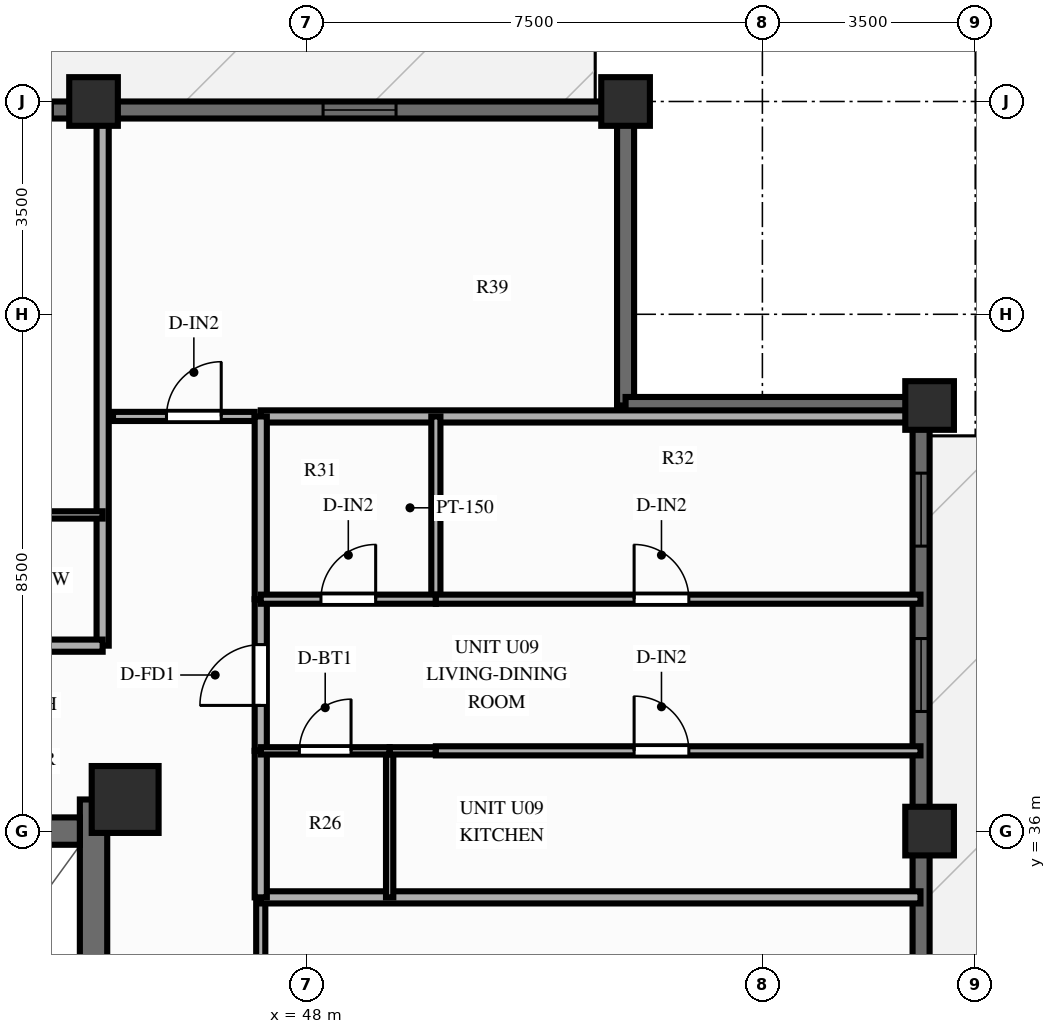
"""IFC4 building model, lengths in metres.
Left out: names, types, materials, properties, quantities, classifications, styles, units other than length and angle.
Written with IfcOpenShell. Run it as: python <this file> out.ifc"""

import sys

from ifc_helpers import new_model, si_unit, direction, frame, frame_2d, origin, origin_2d, place, context, subcontext, project, spatial, rectangle, extrude, source, transform, mapped, element, fill, save


model = new_model("IFC4")
c1 = context("Model", 3, precision=1e-05, world=origin(), true_north=direction((0.0, 1.0)))
c2 = subcontext(c1, "Body", "Model", "MODEL_VIEW")
j1 = project(units=[si_unit("LENGTHUNIT", "METRE"), si_unit("PLANEANGLEUNIT", "RADIAN")], contexts=[c1])
p1 = place(None, origin())
s1 = spatial("IfcSite", under=j1, at=p1, CompositionType="ELEMENT")
p2 = place(p1, origin())
s2 = spatial("IfcBuilding", under=s1, at=p2, CompositionType="ELEMENT")
p3 = place(p2, frame((0.0, 0.0, 189.7)))
s3 = spatial("IfcBuildingStorey", under=s2, at=p3, CompositionType="ELEMENT", Elevation=189.7)
p4 = place(p3, frame((44.5, 17.48, 0.0), z_axis=(0.0, 0.0, 1.0), x_axis=(0.0, 1.0, 0.0)))
e1 = element("IfcWall", 1, at=p4, inside=s3, PredefinedType="SHEAR", context=c2, shape_type="SweptSolid", body=[
    extrude(rectangle(XDim=19.04, YDim=0.45, at=frame_2d((9.52, 0.0))), origin(), (0.0, 0.0, 1.0), 3.0),
])
p5 = place(p4, frame((12.67, 0.0, 0.0), z_axis=(0.0, 0.0, 1.0), x_axis=(-1.0, 0.0, 0.0)))
e2 = element("IfcOpeningElement", 2, at=p5, cuts=e1, PredefinedType="OPENING", context=c2, shape_type="SweptSolid", body=[
    extrude(rectangle(XDim=1.1, YDim=2.15, at=frame_2d((0.55, 1.075))), frame((0.0, 0.237, 0.0), z_axis=(0.0, -1.0, 0.0), x_axis=(1.0, 0.0, 0.0)), (0.0, 0.0, 1.0), 0.474),
])
p6 = place(p3, frame((31.725, 36.0, 0.0), z_axis=(0.0, 0.0, 1.0), x_axis=(1.0, 0.0, 0.0)))
e3 = element("IfcWall", 3, at=p6, inside=s3, PredefinedType="SHEAR", context=c2, shape_type="SweptSolid", body=[
    extrude(rectangle(XDim=12.55, YDim=0.45, at=frame_2d((6.275, 0.0))), origin(), (0.0, 0.0, 1.0), 3.0),
])
p7 = place(p6, frame((5.225, 0.0, 0.0), z_axis=(0.0, 0.0, 1.0), x_axis=(-1.0, 0.0, 0.0)))
e4 = element("IfcOpeningElement", 4, at=p7, cuts=e3, PredefinedType="OPENING", context=c2, shape_type="SweptSolid", body=[
    extrude(rectangle(XDim=1.4, YDim=2.15, at=frame_2d((0.7, 1.075))), frame((0.0, 0.237, 0.0), z_axis=(0.0, -1.0, 0.0), x_axis=(1.0, 0.0, 0.0)), (0.0, 0.0, 1.0), 0.474),
])
m1 = source(origin(), c2, "Body", "SweptSolid", [
    extrude(rectangle(XDim=1.1, YDim=1.1, at=origin_2d()), origin(), (0.0, 0.0, 1.0), 3.0),
])
p8 = place(p3, frame((45.02, 36.52, 0.0), z_axis=(0.0, 0.0, 1.0), x_axis=(1.0, 0.0, 0.0)))
e5 = element("IfcColumn", 5, at=p8, inside=s3, PredefinedType="COLUMN", context=c2, shape_type="MappedRepresentation", body=[
    mapped(m1, transform((0.0, 0.0, 0.0), scale=1.0)),
])
m2 = source(origin(), c2, "Body", "SweptSolid", [
    extrude(rectangle(XDim=0.8, YDim=0.8, at=origin_2d()), origin(), (0.0, 0.0, 1.0), 3.0),
])
for number, where, z_axis, x_axis in (
    (6, (58.25, 36.0, 0.0), (0.0, 0.0, 1.0), (1.0, 0.0, 0.0)),
    (7, (58.25, 43.0, 0.0), (0.0, 0.0, 1.0), (1.0, 0.0, 0.0)),
    (8, (53.25, 48.0, 0.0), (0.0, 0.0, 1.0), (1.0, 0.0, 0.0)),
    (9, (44.5, 48.0, 0.0), (0.0, 0.0, 1.0), (1.0, 0.0, 0.0)),
):
    element("IfcColumn", number, at=place(p3, frame(where, z_axis=z_axis, x_axis=x_axis)), inside=s3, PredefinedType="COLUMN", context=c2, shape_type="MappedRepresentation", body=[
        mapped(m2, transform((0.0, 0.0, 0.0), scale=1.0)),
    ])
p9 = place(p3, frame((22.75, 47.86, 0.0), z_axis=(0.0, 0.0, 1.0), x_axis=(1.0, 0.0, 0.0)))
e10 = element("IfcWall", 10, at=p9, inside=s3, PredefinedType="SOLIDWALL", context=c2, shape_type="SweptSolid", body=[
    extrude(rectangle(XDim=30.5, YDim=0.28, at=frame_2d((15.25, 0.0))), origin(), (0.0, 0.0, 1.0), 2.28),
])
p10 = place(p9, frame((3.825, 0.0, 0.0)))
e11 = element("IfcOpeningElement", 11, at=p10, cuts=e10, PredefinedType="OPENING", context=c2, shape_type="SweptSolid", body=[
    extrude(rectangle(XDim=1.1, YDim=2.15, at=frame_2d((0.55, 1.075))), frame((0.0, 0.152, 0.0), z_axis=(0.0, -1.0, 0.0), x_axis=(1.0, 0.0, 0.0)), (0.0, 0.0, 1.0), 0.304),
])
p11 = place(p9, frame((9.395, 0.0, 0.25)))
e12 = element("IfcOpeningElement", 12, at=p11, cuts=e10, PredefinedType="OPENING", context=c2, shape_type="SweptSolid", body=[
    extrude(rectangle(XDim=0.95, YDim=1.5, at=frame_2d((0.475, 0.75))), frame((0.0, 0.152, 0.0), z_axis=(0.0, -1.0, 0.0), x_axis=(1.0, 0.0, 0.0)), (0.0, 0.0, 1.0), 0.304),
])
p12 = place(p9, frame((11.483, 0.0, 0.25)))
e13 = element("IfcOpeningElement", 13, at=p12, cuts=e10, PredefinedType="OPENING", context=c2, shape_type="SweptSolid", body=[
    extrude(rectangle(XDim=1.2, YDim=1.5, at=frame_2d((0.6, 0.75))), frame((0.0, 0.152, 0.0), z_axis=(0.0, -1.0, 0.0), x_axis=(1.0, 0.0, 0.0)), (0.0, 0.0, 1.0), 0.304),
])
p13 = place(p9, frame((14.383, 0.0, 0.25)))
e14 = element("IfcOpeningElement", 14, at=p13, cuts=e10, PredefinedType="OPENING", context=c2, shape_type="SweptSolid", body=[
    extrude(rectangle(XDim=1.2, YDim=1.5, at=frame_2d((0.6, 0.75))), frame((0.0, 0.152, 0.0), z_axis=(0.0, -1.0, 0.0), x_axis=(1.0, 0.0, 0.0)), (0.0, 0.0, 1.0), 0.304),
])
p14 = place(p9, frame((17.393, 0.0, 0.25)))
e15 = element("IfcOpeningElement", 15, at=p14, cuts=e10, PredefinedType="OPENING", context=c2, shape_type="SweptSolid", body=[
    extrude(rectangle(XDim=1.2, YDim=1.5, at=frame_2d((0.6, 0.75))), frame((0.0, 0.152, 0.0), z_axis=(0.0, -1.0, 0.0), x_axis=(1.0, 0.0, 0.0)), (0.0, 0.0, 1.0), 0.304),
])
p15 = place(p9, frame((19.874, 0.0, 0.25)))
e16 = element("IfcOpeningElement", 16, at=p15, cuts=e10, PredefinedType="OPENING", context=c2, shape_type="SweptSolid", body=[
    extrude(rectangle(XDim=1.2, YDim=1.5, at=frame_2d((0.6, 0.75))), frame((0.0, 0.152, 0.0), z_axis=(0.0, -1.0, 0.0), x_axis=(1.0, 0.0, 0.0)), (0.0, 0.0, 1.0), 0.304),
])
p16 = place(p9, frame((25.525, 0.0, 0.25)))
e17 = element("IfcOpeningElement", 17, at=p16, cuts=e10, PredefinedType="OPENING", context=c2, shape_type="SweptSolid", body=[
    extrude(rectangle(XDim=1.2, YDim=1.5, at=frame_2d((0.6, 0.75))), frame((0.0, 0.152, 0.0), z_axis=(0.0, -1.0, 0.0), x_axis=(1.0, 0.0, 0.0)), (0.0, 0.0, 1.0), 0.304),
])
p17 = place(p3, frame((58.11, 11.0, 0.0), z_axis=(0.0, 0.0, 1.0), x_axis=(0.0, 1.0, 0.0)))
e18 = element("IfcWall", 18, at=p17, inside=s3, PredefinedType="SOLIDWALL", context=c2, shape_type="SweptSolid", body=[
    extrude(rectangle(XDim=32.0, YDim=0.28, at=frame_2d((16.0, 0.0))), origin(), (0.0, 0.0, 1.0), 2.28),
])
p18 = place(p17, frame((2.9, 0.0, 0.25)))
e19 = element("IfcOpeningElement", 19, at=p18, cuts=e18, PredefinedType="OPENING", context=c2, shape_type="SweptSolid", body=[
    extrude(rectangle(XDim=1.2, YDim=1.5, at=frame_2d((0.6, 0.75))), frame((0.0, 0.152, 0.0), z_axis=(0.0, -1.0, 0.0), x_axis=(1.0, 0.0, 0.0)), (0.0, 0.0, 1.0), 0.304),
])
p19 = place(p17, frame((8.597, 0.0, 0.25)))
e20 = element("IfcOpeningElement", 20, at=p19, cuts=e18, PredefinedType="OPENING", context=c2, shape_type="SweptSolid", body=[
    extrude(rectangle(XDim=1.2, YDim=1.5, at=frame_2d((0.6, 0.75))), frame((0.0, 0.152, 0.0), z_axis=(0.0, -1.0, 0.0), x_axis=(1.0, 0.0, 0.0)), (0.0, 0.0, 1.0), 0.304),
])
p20 = place(p17, frame((11.05, 0.0, 0.25)))
e21 = element("IfcOpeningElement", 21, at=p20, cuts=e18, PredefinedType="OPENING", context=c2, shape_type="SweptSolid", body=[
    extrude(rectangle(XDim=1.2, YDim=1.5, at=frame_2d((0.6, 0.75))), frame((0.0, 0.152, 0.0), z_axis=(0.0, -1.0, 0.0), x_axis=(1.0, 0.0, 0.0)), (0.0, 0.0, 1.0), 0.304),
])
p21 = place(p17, frame((13.897, 0.0, 0.25)))
e22 = element("IfcOpeningElement", 22, at=p21, cuts=e18, PredefinedType="OPENING", context=c2, shape_type="SweptSolid", body=[
    extrude(rectangle(XDim=1.2, YDim=1.5, at=frame_2d((0.6, 0.75))), frame((0.0, 0.152, 0.0), z_axis=(0.0, -1.0, 0.0), x_axis=(1.0, 0.0, 0.0)), (0.0, 0.0, 1.0), 0.304),
])
p22 = place(p17, frame((20.755, 0.0, 0.0), z_axis=(0.0, 0.0, 1.0), x_axis=(-1.0, 0.0, 0.0)))
e23 = element("IfcOpeningElement", 23, at=p22, cuts=e18, PredefinedType="OPENING", context=c2, shape_type="SweptSolid", body=[
    extrude(rectangle(XDim=1.6, YDim=2.15, at=frame_2d((0.8, 1.075))), frame((0.0, 0.152, 0.0), z_axis=(0.0, -1.0, 0.0), x_axis=(1.0, 0.0, 0.0)), (0.0, 0.0, 1.0), 0.304),
])
p23 = place(p17, frame((26.967, 0.0, 0.25)))
e24 = element("IfcOpeningElement", 24, at=p23, cuts=e18, PredefinedType="OPENING", context=c2, shape_type="SweptSolid", body=[
    extrude(rectangle(XDim=1.2, YDim=1.5, at=frame_2d((0.6, 0.75))), frame((0.0, 0.152, 0.0), z_axis=(0.0, -1.0, 0.0), x_axis=(1.0, 0.0, 0.0)), (0.0, 0.0, 1.0), 0.304),
])
p24 = place(p17, frame((29.687, 0.0, 0.25)))
e25 = element("IfcOpeningElement", 25, at=p24, cuts=e18, PredefinedType="OPENING", context=c2, shape_type="SweptSolid", body=[
    extrude(rectangle(XDim=1.2, YDim=1.5, at=frame_2d((0.6, 0.75))), frame((0.0, 0.152, 0.0), z_axis=(0.0, -1.0, 0.0), x_axis=(1.0, 0.0, 0.0)), (0.0, 0.0, 1.0), 0.304),
])
for number, where, z_axis, x_axis in (
    (26, (53.25, 43.0, 0.0), (0.0, 0.0, 1.0), (0.0, 1.0, 0.0)),
    (27, (53.25, 43.0, 0.0), (0.0, 0.0, 1.0), (1.0, 0.0, 0.0)),
):
    element("IfcWall", number, at=place(p3, frame(where, z_axis=z_axis, x_axis=x_axis)), inside=s3, PredefinedType="SOLIDWALL", context=c2, shape_type="SweptSolid", body=[
        extrude(rectangle(XDim=4.92, YDim=0.28, at=frame_2d((2.46, 0.0))), origin(), (0.0, 0.0, 1.0), 2.28),
    ])
p25 = place(p3, frame((44.82, 42.82, 0.0), z_axis=(0.0, 0.0, 1.0), x_axis=(1.0, 0.0, 0.0)))
e28 = element("IfcWall", 28, at=p25, inside=s3, PredefinedType="PARTITIONING", context=c2, shape_type="SweptSolid", body=[
    extrude(rectangle(XDim=2.33, YDim=0.15, at=frame_2d((1.165, 0.0))), origin(), (0.0, 0.0, 1.0), 2.79),
])
p26 = place(p25, frame((0.88, 0.0, 0.0)))
e29 = element("IfcOpeningElement", 29, at=p26, cuts=e28, PredefinedType="OPENING", context=c2, shape_type="SweptSolid", body=[
    extrude(rectangle(XDim=0.9, YDim=2.1, at=frame_2d((0.45, 1.05))), frame((0.0, 0.087, 0.0), z_axis=(0.0, -1.0, 0.0), x_axis=(1.0, 0.0, 0.0)), (0.0, 0.0, 1.0), 0.174),
])
p27 = place(p3, frame((44.65, 39.05, 0.0), z_axis=(0.0, 0.0, 1.0), x_axis=(0.0, 1.0, 0.0)))
e30 = element("IfcWall", 30, at=p27, inside=s3, PredefinedType="PARTITIONING", context=c2, shape_type="SweptSolid", body=[
    extrude(rectangle(XDim=8.8, YDim=0.2, at=frame_2d((4.4, 0.0))), origin(), (0.0, 0.0, 1.0), 2.39),
])
p28 = place(p3, frame((42.188, 39.05, 0.0), z_axis=(0.0, 0.0, 1.0), x_axis=(1.0, 0.0, 0.0)))
e31 = element("IfcWall", 31, at=p28, inside=s3, PredefinedType="PARTITIONING", context=c2, shape_type="SweptSolid", body=[
    extrude(rectangle(XDim=2.462, YDim=0.2, at=frame_2d((1.231, 0.0))), origin(), (0.0, 0.0, 1.0), 2.79),
])
p29 = place(p3, frame((42.188, 41.2, 0.0), z_axis=(0.0, 0.0, 1.0), x_axis=(1.0, 0.0, 0.0)))
e32 = element("IfcWall", 32, at=p29, inside=s3, PredefinedType="PARTITIONING", context=c2, shape_type="SweptSolid", body=[
    extrude(rectangle(XDim=2.462, YDim=0.12, at=frame_2d((1.231, 0.0))), origin(), (0.0, 0.0, 1.0), 2.79),
])
p30 = place(p3, frame((47.25, 42.82, 0.0), z_axis=(0.0, 0.0, 1.0), x_axis=(1.0, 0.0, 0.0)))
e33 = element("IfcWall", 33, at=p30, inside=s3, PredefinedType="PARTITIONING", context=c2, shape_type="SweptSolid", body=[
    extrude(rectangle(XDim=10.85, YDim=0.2, at=frame_2d((5.425, 0.0))), origin(), (0.0, 0.0, 1.0), 2.79),
])
p31 = place(p3, frame((47.25, 27.0, 0.0), z_axis=(0.0, 0.0, 1.0), x_axis=(0.0, 1.0, 0.0)))
e34 = element("IfcWall", 34, at=p31, inside=s3, PredefinedType="PARTITIONING", context=c2, shape_type="SweptSolid", body=[
    extrude(rectangle(XDim=7.91, YDim=0.15, at=frame_2d((3.955, 0.0))), origin(), (0.0, 0.0, 1.0), 2.79),
])
p32 = place(p31, frame((3.405, 0.0, 0.0)))
e35 = element("IfcOpeningElement", 35, at=p32, cuts=e34, PredefinedType="OPENING", context=c2, shape_type="SweptSolid", body=[
    extrude(rectangle(XDim=1.1, YDim=2.15, at=frame_2d((0.55, 1.075))), frame((0.0, 0.087, 0.0), z_axis=(0.0, -1.0, 0.0), x_axis=(1.0, 0.0, 0.0)), (0.0, 0.0, 1.0), 0.174),
])
p33 = place(p3, frame((47.25, 34.91, 0.0), z_axis=(0.0, 0.0, 1.0), x_axis=(1.0, 0.0, 0.0)))
e36 = element("IfcWall", 36, at=p33, inside=s3, PredefinedType="PARTITIONING", context=c2, shape_type="SweptSolid", body=[
    extrude(rectangle(XDim=10.85, YDim=0.2, at=frame_2d((5.425, 0.0))), origin(), (0.0, 0.0, 1.0), 2.79),
])
p34 = place(p3, frame((47.25, 34.91, 0.0), z_axis=(0.0, 0.0, 1.0), x_axis=(0.0, 1.0, 0.0)))
e37 = element("IfcWall", 37, at=p34, inside=s3, PredefinedType="PARTITIONING", context=c2, shape_type="SweptSolid", body=[
    extrude(rectangle(XDim=2.41, YDim=0.2, at=frame_2d((1.205, 0.0))), origin(), (0.0, 0.0, 1.0), 2.79),
])
p35 = place(p3, frame((47.25, 37.32, 0.0), z_axis=(0.0, 0.0, 1.0), x_axis=(0.0, 1.0, 0.0)))
e38 = element("IfcWall", 38, at=p35, inside=s3, PredefinedType="PARTITIONING", context=c2, shape_type="SweptSolid", body=[
    extrude(rectangle(XDim=2.494, YDim=0.2, at=frame_2d((1.247, 0.0))), origin(), (0.0, 0.0, 1.0), 2.79),
])
p36 = place(p35, frame((0.747, 0.0, 0.0)))
e39 = element("IfcOpeningElement", 39, at=p36, cuts=e38, PredefinedType="OPENING", context=c2, shape_type="SweptSolid", body=[
    extrude(rectangle(XDim=1.0, YDim=2.15, at=frame_2d((0.5, 1.075))), frame((0.0, 0.112, 0.0), z_axis=(0.0, -1.0, 0.0), x_axis=(1.0, 0.0, 0.0)), (0.0, 0.0, 1.0), 0.224),
])
p37 = place(p3, frame((47.25, 39.814, 0.0), z_axis=(0.0, 0.0, 1.0), x_axis=(0.0, 1.0, 0.0)))
e40 = element("IfcWall", 40, at=p37, inside=s3, PredefinedType="PARTITIONING", context=c2, shape_type="SweptSolid", body=[
    extrude(rectangle(XDim=3.006, YDim=0.2, at=frame_2d((1.503, 0.0))), origin(), (0.0, 0.0, 1.0), 2.79),
])
p38 = place(p3, frame((49.37, 34.91, 0.0), z_axis=(0.0, 0.0, 1.0), x_axis=(0.0, 1.0, 0.0)))
e41 = element("IfcWall", 41, at=p38, inside=s3, PredefinedType="PARTITIONING", context=c2, shape_type="SweptSolid", body=[
    extrude(rectangle(XDim=2.41, YDim=0.12, at=frame_2d((1.205, 0.0))), origin(), (0.0, 0.0, 1.0), 2.79),
])
p39 = place(p3, frame((50.13, 39.814, 0.0), z_axis=(0.0, 0.0, 1.0), x_axis=(0.0, 1.0, 0.0)))
e42 = element("IfcWall", 42, at=p39, inside=s3, PredefinedType="PARTITIONING", context=c2, shape_type="SweptSolid", body=[
    extrude(rectangle(XDim=3.006, YDim=0.15, at=frame_2d((1.503, 0.0))), origin(), (0.0, 0.0, 1.0), 2.79),
])
p40 = place(p3, frame((47.25, 37.32, 0.0), z_axis=(0.0, 0.0, 1.0), x_axis=(1.0, 0.0, 0.0)))
e43 = element("IfcWall", 43, at=p40, inside=s3, PredefinedType="PARTITIONING", context=c2, shape_type="SweptSolid", body=[
    extrude(rectangle(XDim=2.12, YDim=0.12, at=frame_2d((1.06, 0.0))), origin(), (0.0, 0.0, 1.0), 2.79),
])
p41 = place(p40, frame((0.635, 0.0, 0.0)))
e44 = element("IfcOpeningElement", 44, at=p41, cuts=e43, PredefinedType="OPENING", context=c2, shape_type="SweptSolid", body=[
    extrude(rectangle(XDim=0.85, YDim=2.05, at=frame_2d((0.425, 1.025))), frame((0.0, 0.072, 0.0), z_axis=(0.0, -1.0, 0.0), x_axis=(1.0, 0.0, 0.0)), (0.0, 0.0, 1.0), 0.144),
])
p42 = place(p3, frame((49.37, 37.32, 0.0), z_axis=(0.0, 0.0, 1.0), x_axis=(1.0, 0.0, 0.0)))
e45 = element("IfcWall", 45, at=p42, inside=s3, PredefinedType="PARTITIONING", context=c2, shape_type="SweptSolid", body=[
    extrude(rectangle(XDim=0.76, YDim=0.12, at=frame_2d((0.38, 0.0))), origin(), (0.0, 0.0, 1.0), 2.79),
])
p43 = place(p3, frame((50.13, 37.32, 0.0), z_axis=(0.0, 0.0, 1.0), x_axis=(1.0, 0.0, 0.0)))
e46 = element("IfcWall", 46, at=p43, inside=s3, PredefinedType="PARTITIONING", context=c2, shape_type="SweptSolid", body=[
    extrude(rectangle(XDim=7.97, YDim=0.15, at=frame_2d((3.985, 0.0))), origin(), (0.0, 0.0, 1.0), 2.79),
])
p44 = place(p43, frame((3.26, 0.0, 0.0)))
e47 = element("IfcOpeningElement", 47, at=p44, cuts=e46, PredefinedType="OPENING", context=c2, shape_type="SweptSolid", body=[
    extrude(rectangle(XDim=0.9, YDim=2.1, at=frame_2d((0.45, 1.05))), frame((0.0, 0.087, 0.0), z_axis=(0.0, -1.0, 0.0), x_axis=(1.0, 0.0, 0.0)), (0.0, 0.0, 1.0), 0.174),
])
p45 = place(p3, frame((47.25, 39.814, 0.0), z_axis=(0.0, 0.0, 1.0), x_axis=(1.0, 0.0, 0.0)))
e48 = element("IfcWall", 48, at=p45, inside=s3, PredefinedType="PARTITIONING", context=c2, shape_type="SweptSolid", body=[
    extrude(rectangle(XDim=2.88, YDim=0.15, at=frame_2d((1.44, 0.0))), origin(), (0.0, 0.0, 1.0), 2.79),
])
p46 = place(p45, frame((0.99, 0.0, 0.0)))
e49 = element("IfcOpeningElement", 49, at=p46, cuts=e48, PredefinedType="OPENING", context=c2, shape_type="SweptSolid", body=[
    extrude(rectangle(XDim=0.9, YDim=2.1, at=frame_2d((0.45, 1.05))), frame((0.0, 0.087, 0.0), z_axis=(0.0, -1.0, 0.0), x_axis=(1.0, 0.0, 0.0)), (0.0, 0.0, 1.0), 0.174),
])
p47 = place(p3, frame((50.13, 39.814, 0.0), z_axis=(0.0, 0.0, 1.0), x_axis=(1.0, 0.0, 0.0)))
e50 = element("IfcWall", 50, at=p47, inside=s3, PredefinedType="PARTITIONING", context=c2, shape_type="SweptSolid", body=[
    extrude(rectangle(XDim=7.97, YDim=0.15, at=frame_2d((3.985, 0.0))), origin(), (0.0, 0.0, 1.0), 2.79),
])
p48 = place(p47, frame((3.26, 0.0, 0.0)))
e51 = element("IfcOpeningElement", 51, at=p48, cuts=e50, PredefinedType="OPENING", context=c2, shape_type="SweptSolid", body=[
    extrude(rectangle(XDim=0.9, YDim=2.1, at=frame_2d((0.45, 1.05))), frame((0.0, 0.087, 0.0), z_axis=(0.0, -1.0, 0.0), x_axis=(1.0, 0.0, 0.0)), (0.0, 0.0, 1.0), 0.174),
])
m3 = source(origin(), c2, "Body", "SweptSolid", [
    extrude(rectangle(XDim=1.2, YDim=1.5, at=frame_2d((0.6, 0.75))), frame((0.0, 0.03, 0.0), z_axis=(0.0, -1.0, 0.0), x_axis=(1.0, 0.0, 0.0)), (0.0, 0.0, 1.0), 0.06),
])
p49 = place(p15, origin())
e52 = element("IfcWindow", 52, at=p49, inside=s3, PartitioningType="SINGLE_PANEL", PredefinedType="WINDOW", context=c2, shape_type="MappedRepresentation", body=[
    mapped(m3, transform((0.0, 0.0, 0.0), scale=1.0)),
])
fill(e16, e52)
p50 = place(p16, origin())
e53 = element("IfcWindow", 53, at=p50, inside=s3, PartitioningType="SINGLE_PANEL", PredefinedType="WINDOW", context=c2, shape_type="MappedRepresentation", body=[
    mapped(m3, transform((0.0, 0.0, 0.0), scale=1.0)),
])
fill(e17, e53)
p51 = place(p23, origin())
e54 = element("IfcWindow", 54, at=p51, inside=s3, PartitioningType="SINGLE_PANEL", PredefinedType="WINDOW", context=c2, shape_type="MappedRepresentation", body=[
    mapped(m3, transform((0.0, 0.0, 0.0), scale=1.0)),
])
fill(e24, e54)
p52 = place(p24, origin())
e55 = element("IfcWindow", 55, at=p52, inside=s3, PartitioningType="SINGLE_PANEL", PredefinedType="WINDOW", context=c2, shape_type="MappedRepresentation", body=[
    mapped(m3, transform((0.0, 0.0, 0.0), scale=1.0)),
])
fill(e25, e55)
m4 = source(origin(), c2, "Body", "SweptSolid", [
    extrude(rectangle(XDim=0.9, YDim=2.1, at=frame_2d((0.45, 1.05))), frame((0.0, 0.025, 0.0), z_axis=(0.0, -1.0, 0.0), x_axis=(1.0, 0.0, 0.0)), (0.0, 0.0, 1.0), 0.05),
])
p53 = place(p26, origin())
e56 = element("IfcDoor", 56, at=p53, inside=s3, OperationType="SINGLE_SWING_RIGHT", PredefinedType="DOOR", context=c2, shape_type="MappedRepresentation", body=[
    mapped(m4, transform((0.0, 0.0, 0.0), scale=1.0)),
])
fill(e29, e56)
m5 = source(origin(), c2, "Body", "SweptSolid", [
    extrude(rectangle(XDim=1.0, YDim=2.15, at=frame_2d((0.5, 1.075))), frame((0.0, 0.025, 0.0), z_axis=(0.0, -1.0, 0.0), x_axis=(1.0, 0.0, 0.0)), (0.0, 0.0, 1.0), 0.05),
])
p54 = place(p36, origin())
e57 = element("IfcDoor", 57, at=p54, inside=s3, OperationType="SINGLE_SWING_LEFT", PredefinedType="DOOR", context=c2, shape_type="MappedRepresentation", body=[
    mapped(m5, transform((0.0, 0.0, 0.0), scale=1.0)),
])
fill(e39, e57)
m6 = source(origin(), c2, "Body", "SweptSolid", [
    extrude(rectangle(XDim=0.85, YDim=2.05, at=frame_2d((0.425, 1.025))), frame((0.0, 0.025, 0.0), z_axis=(0.0, -1.0, 0.0), x_axis=(1.0, 0.0, 0.0)), (0.0, 0.0, 1.0), 0.05),
])
p55 = place(p41, origin())
e58 = element("IfcDoor", 58, at=p55, inside=s3, OperationType="SINGLE_SWING_RIGHT", PredefinedType="DOOR", context=c2, shape_type="MappedRepresentation", body=[
    mapped(m6, transform((0.0, 0.0, 0.0), scale=1.0)),
])
fill(e44, e58)
p56 = place(p44, origin())
e59 = element("IfcDoor", 59, at=p56, inside=s3, OperationType="SINGLE_SWING_LEFT", PredefinedType="DOOR", context=c2, shape_type="MappedRepresentation", body=[
    mapped(m4, transform((0.0, 0.0, 0.0), scale=1.0)),
])
fill(e47, e59)
p57 = place(p46, origin())
e60 = element("IfcDoor", 60, at=p57, inside=s3, OperationType="SINGLE_SWING_RIGHT", PredefinedType="DOOR", context=c2, shape_type="MappedRepresentation", body=[
    mapped(m4, transform((0.0, 0.0, 0.0), scale=1.0)),
])
fill(e49, e60)
p58 = place(p48, origin())
e61 = element("IfcDoor", 61, at=p58, inside=s3, OperationType="SINGLE_SWING_LEFT", PredefinedType="DOOR", context=c2, shape_type="MappedRepresentation", body=[
    mapped(m4, transform((0.0, 0.0, 0.0), scale=1.0)),
])
fill(e51, e61)
save(model, sys.argv[1])
